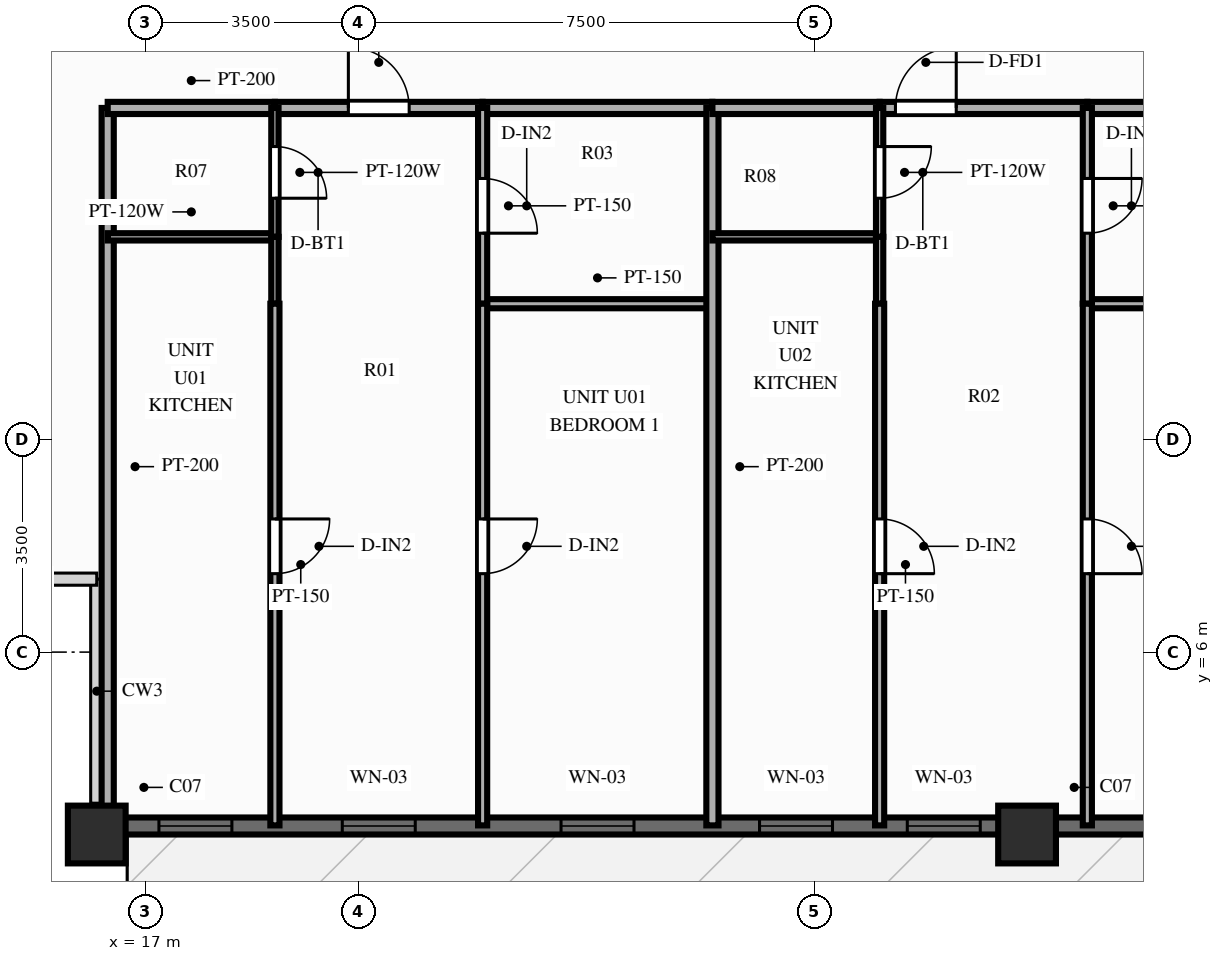
"""IFC4 building model, lengths in metres.
Left out: names, types, materials, properties, quantities, classifications, styles, units other than length and angle.
Written with IfcOpenShell. Run it as: python <this file> out.ifc"""

import sys

from ifc_helpers import new_model, si_unit, direction, frame, frame_2d, origin, origin_2d, place, context, subcontext, project, spatial, rectangle, extrude, source, transform, mapped, element, fill, save


model = new_model("IFC4")
c1 = context("Model", 3, precision=1e-05, world=origin(), true_north=direction((0.0, 1.0)))
c2 = subcontext(c1, "Body", "Model", "MODEL_VIEW")
j1 = project(units=[si_unit("LENGTHUNIT", "METRE"), si_unit("PLANEANGLEUNIT", "RADIAN")], contexts=[c1])
p1 = place(None, origin())
s1 = spatial("IfcSite", under=j1, at=p1, CompositionType="ELEMENT")
p2 = place(p1, origin())
s2 = spatial("IfcBuilding", under=s1, at=p2, CompositionType="ELEMENT")
p3 = place(p2, frame((0.0, 0.0, 89.85)))
s3 = spatial("IfcBuildingStorey", under=s2, at=p3, CompositionType="ELEMENT", Elevation=89.85)
m1 = source(origin(), c2, "Body", "SweptSolid", [
    extrude(rectangle(XDim=0.95, YDim=0.95, at=origin_2d()), origin(), (0.0, 0.0, 1.0), 3.0),
])
for number, where, z_axis, x_axis in (
    (1, (16.2, 3.0, 0.0), (0.0, 0.0, 1.0), (1.0, 0.0, 0.0)),
    (2, (31.5, 3.0, 0.0), (0.0, 0.0, 1.0), (1.0, 0.0, 0.0)),
):
    element("IfcColumn", number, at=place(p3, frame(where, z_axis=z_axis, x_axis=x_axis)), inside=s3, PredefinedType="COLUMN", context=c2, shape_type="MappedRepresentation", body=[
        mapped(m1, transform((0.0, 0.0, 0.0), scale=1.0)),
    ])
p4 = place(p3, frame((16.2, 3.14, 0.0), z_axis=(0.0, 0.0, 1.0), x_axis=(1.0, 0.0, 0.0)))
e3 = element("IfcWall", 3, at=p4, inside=s3, PredefinedType="SOLIDWALL", context=c2, shape_type="SweptSolid", body=[
    extrude(rectangle(XDim=43.6, YDim=0.28, at=frame_2d((21.8, 0.0))), origin(), (0.0, 0.0, 1.0), 2.28),
])
p5 = place(p4, frame((1.022, 0.0, 0.25)))
e4 = element("IfcOpeningElement", 4, at=p5, cuts=e3, PredefinedType="OPENING", context=c2, shape_type="SweptSolid", body=[
    extrude(rectangle(XDim=1.2, YDim=1.5, at=frame_2d((0.6, 0.75))), frame((0.0, 0.152, 0.0), z_axis=(0.0, -1.0, 0.0), x_axis=(1.0, 0.0, 0.0)), (0.0, 0.0, 1.0), 0.304),
])
p6 = place(p4, frame((4.038, 0.0, 0.25)))
e5 = element("IfcOpeningElement", 5, at=p6, cuts=e3, PredefinedType="OPENING", context=c2, shape_type="SweptSolid", body=[
    extrude(rectangle(XDim=1.2, YDim=1.5, at=frame_2d((0.6, 0.75))), frame((0.0, 0.152, 0.0), z_axis=(0.0, -1.0, 0.0), x_axis=(1.0, 0.0, 0.0)), (0.0, 0.0, 1.0), 0.304),
])
p7 = place(p4, frame((7.635, 0.0, 0.25)))
e6 = element("IfcOpeningElement", 6, at=p7, cuts=e3, PredefinedType="OPENING", context=c2, shape_type="SweptSolid", body=[
    extrude(rectangle(XDim=1.2, YDim=1.5, at=frame_2d((0.6, 0.75))), frame((0.0, 0.152, 0.0), z_axis=(0.0, -1.0, 0.0), x_axis=(1.0, 0.0, 0.0)), (0.0, 0.0, 1.0), 0.304),
])
p8 = place(p4, frame((10.9, 0.0, 0.25)))
e7 = element("IfcOpeningElement", 7, at=p8, cuts=e3, PredefinedType="OPENING", context=c2, shape_type="SweptSolid", body=[
    extrude(rectangle(XDim=1.2, YDim=1.5, at=frame_2d((0.6, 0.75))), frame((0.0, 0.152, 0.0), z_axis=(0.0, -1.0, 0.0), x_axis=(1.0, 0.0, 0.0)), (0.0, 0.0, 1.0), 0.304),
])
p9 = place(p4, frame((13.33, 0.0, 0.25)))
e8 = element("IfcOpeningElement", 8, at=p9, cuts=e3, PredefinedType="OPENING", context=c2, shape_type="SweptSolid", body=[
    extrude(rectangle(XDim=1.2, YDim=1.5, at=frame_2d((0.6, 0.75))), frame((0.0, 0.152, 0.0), z_axis=(0.0, -1.0, 0.0), x_axis=(1.0, 0.0, 0.0)), (0.0, 0.0, 1.0), 0.304),
])
p10 = place(p4, frame((17.581, 0.0, 0.25)))
e9 = element("IfcOpeningElement", 9, at=p10, cuts=e3, PredefinedType="OPENING", context=c2, shape_type="SweptSolid", body=[
    extrude(rectangle(XDim=1.2, YDim=1.5, at=frame_2d((0.6, 0.75))), frame((0.0, 0.152, 0.0), z_axis=(0.0, -1.0, 0.0), x_axis=(1.0, 0.0, 0.0)), (0.0, 0.0, 1.0), 0.304),
])
p11 = place(p4, frame((20.988, 0.0, 0.25)))
e10 = element("IfcOpeningElement", 10, at=p11, cuts=e3, PredefinedType="OPENING", context=c2, shape_type="SweptSolid", body=[
    extrude(rectangle(XDim=1.2, YDim=1.5, at=frame_2d((0.6, 0.75))), frame((0.0, 0.152, 0.0), z_axis=(0.0, -1.0, 0.0), x_axis=(1.0, 0.0, 0.0)), (0.0, 0.0, 1.0), 0.304),
])
p12 = place(p4, frame((26.095, 0.0, 0.0), z_axis=(0.0, 0.0, 1.0), x_axis=(-1.0, 0.0, 0.0)))
e11 = element("IfcOpeningElement", 11, at=p12, cuts=e3, PredefinedType="OPENING", context=c2, shape_type="SweptSolid", body=[
    extrude(rectangle(XDim=1.1, YDim=2.15, at=frame_2d((0.55, 1.075))), frame((0.0, 0.152, 0.0), z_axis=(0.0, -1.0, 0.0), x_axis=(1.0, 0.0, 0.0)), (0.0, 0.0, 1.0), 0.304),
])
p13 = place(p4, frame((29.58, 0.0, 0.25)))
e12 = element("IfcOpeningElement", 12, at=p13, cuts=e3, PredefinedType="OPENING", context=c2, shape_type="SweptSolid", body=[
    extrude(rectangle(XDim=1.2, YDim=1.5, at=frame_2d((0.6, 0.75))), frame((0.0, 0.152, 0.0), z_axis=(0.0, -1.0, 0.0), x_axis=(1.0, 0.0, 0.0)), (0.0, 0.0, 1.0), 0.304),
])
p14 = place(p4, frame((32.663, 0.0, 0.25)))
e13 = element("IfcOpeningElement", 13, at=p14, cuts=e3, PredefinedType="OPENING", context=c2, shape_type="SweptSolid", body=[
    extrude(rectangle(XDim=1.2, YDim=1.5, at=frame_2d((0.6, 0.75))), frame((0.0, 0.152, 0.0), z_axis=(0.0, -1.0, 0.0), x_axis=(1.0, 0.0, 0.0)), (0.0, 0.0, 1.0), 0.304),
])
p15 = place(p4, frame((36.632, 0.0, 0.25)))
e14 = element("IfcOpeningElement", 14, at=p15, cuts=e3, PredefinedType="OPENING", context=c2, shape_type="SweptSolid", body=[
    extrude(rectangle(XDim=1.2, YDim=1.5, at=frame_2d((0.6, 0.75))), frame((0.0, 0.152, 0.0), z_axis=(0.0, -1.0, 0.0), x_axis=(1.0, 0.0, 0.0)), (0.0, 0.0, 1.0), 0.304),
])
p16 = place(p4, frame((40.885, 0.0, 0.25)))
e15 = element("IfcOpeningElement", 15, at=p16, cuts=e3, PredefinedType="OPENING", context=c2, shape_type="SweptSolid", body=[
    extrude(rectangle(XDim=1.2, YDim=1.5, at=frame_2d((0.6, 0.75))), frame((0.0, 0.152, 0.0), z_axis=(0.0, -1.0, 0.0), x_axis=(1.0, 0.0, 0.0)), (0.0, 0.0, 1.0), 0.304),
])
p17 = place(p3, frame((16.38, 14.95, 0.0), z_axis=(0.0, 0.0, 1.0), x_axis=(0.0, -1.0, 0.0)))
e16 = element("IfcWall", 16, at=p17, inside=s3, PredefinedType="PARTITIONING", context=c2, shape_type="SweptSolid", body=[
    extrude(rectangle(XDim=11.8, YDim=0.2, at=frame_2d((5.9, 0.0))), origin(), (0.0, 0.0, 1.0), 2.79),
])
p18 = place(p3, frame((16.38, 14.95, 0.0), z_axis=(0.0, 0.0, 1.0), x_axis=(1.0, 0.0, 0.0)))
e17 = element("IfcWall", 17, at=p18, inside=s3, PredefinedType="PARTITIONING", context=c2, shape_type="SweptSolid", body=[
    extrude(rectangle(XDim=2.75, YDim=0.2, at=frame_2d((1.375, 0.0))), origin(), (0.0, 0.0, 1.0), 2.79),
])
p19 = place(p3, frame((19.13, 14.95, 0.0), z_axis=(0.0, 0.0, 1.0), x_axis=(1.0, 0.0, 0.0)))
e18 = element("IfcWall", 18, at=p19, inside=s3, PredefinedType="PARTITIONING", context=c2, shape_type="SweptSolid", body=[
    extrude(rectangle(XDim=3.416, YDim=0.2, at=frame_2d((1.708, 0.0))), origin(), (0.0, 0.0, 1.0), 2.79),
])
p20 = place(p19, frame((1.208, 0.0, 0.0)))
e19 = element("IfcOpeningElement", 19, at=p20, cuts=e18, PredefinedType="OPENING", context=c2, shape_type="SweptSolid", body=[
    extrude(rectangle(XDim=1.0, YDim=2.15, at=frame_2d((0.5, 1.075))), frame((0.0, 0.112, 0.0), z_axis=(0.0, -1.0, 0.0), x_axis=(1.0, 0.0, 0.0)), (0.0, 0.0, 1.0), 0.224),
])
p21 = place(p3, frame((22.546, 14.95, 0.0), z_axis=(0.0, 0.0, 1.0), x_axis=(1.0, 0.0, 0.0)))
e20 = element("IfcWall", 20, at=p21, inside=s3, PredefinedType="PARTITIONING", context=c2, shape_type="SweptSolid", body=[
    extrude(rectangle(XDim=3.779, YDim=0.2, at=frame_2d((1.89, 0.0))), origin(), (0.0, 0.0, 1.0), 2.79),
])
p22 = place(p3, frame((16.38, 12.83, 0.0), z_axis=(0.0, 0.0, 1.0), x_axis=(1.0, 0.0, 0.0)))
e21 = element("IfcWall", 21, at=p22, inside=s3, PredefinedType="PARTITIONING", context=c2, shape_type="SweptSolid", body=[
    extrude(rectangle(XDim=2.75, YDim=0.12, at=frame_2d((1.375, 0.0))), origin(), (0.0, 0.0, 1.0), 2.79),
])
p23 = place(p3, frame((22.546, 11.73, 0.0), z_axis=(0.0, 0.0, 1.0), x_axis=(1.0, 0.0, 0.0)))
e22 = element("IfcWall", 22, at=p23, inside=s3, PredefinedType="PARTITIONING", context=c2, shape_type="SweptSolid", body=[
    extrude(rectangle(XDim=3.779, YDim=0.15, at=frame_2d((1.89, 0.0))), origin(), (0.0, 0.0, 1.0), 2.79),
])
p24 = place(p3, frame((19.13, 14.95, 0.0), z_axis=(0.0, 0.0, 1.0), x_axis=(0.0, -1.0, 0.0)))
e23 = element("IfcWall", 23, at=p24, inside=s3, PredefinedType="PARTITIONING", context=c2, shape_type="SweptSolid", body=[
    extrude(rectangle(XDim=2.12, YDim=0.12, at=frame_2d((1.06, 0.0))), origin(), (0.0, 0.0, 1.0), 2.79),
])
p25 = place(p24, frame((0.635, 0.0, 0.0)))
e24 = element("IfcOpeningElement", 24, at=p25, cuts=e23, PredefinedType="OPENING", context=c2, shape_type="SweptSolid", body=[
    extrude(rectangle(XDim=0.85, YDim=2.05, at=frame_2d((0.425, 1.025))), frame((0.0, 0.072, 0.0), z_axis=(0.0, -1.0, 0.0), x_axis=(1.0, 0.0, 0.0)), (0.0, 0.0, 1.0), 0.144),
])
p26 = place(p3, frame((19.13, 12.83, 0.0), z_axis=(0.0, 0.0, 1.0), x_axis=(0.0, -1.0, 0.0)))
e25 = element("IfcWall", 25, at=p26, inside=s3, PredefinedType="PARTITIONING", context=c2, shape_type="SweptSolid", body=[
    extrude(rectangle(XDim=1.1, YDim=0.12, at=frame_2d((0.55, 0.0))), origin(), (0.0, 0.0, 1.0), 2.79),
])
p27 = place(p3, frame((19.13, 11.73, 0.0), z_axis=(0.0, 0.0, 1.0), x_axis=(0.0, -1.0, 0.0)))
e26 = element("IfcWall", 26, at=p27, inside=s3, PredefinedType="PARTITIONING", context=c2, shape_type="SweptSolid", body=[
    extrude(rectangle(XDim=8.58, YDim=0.15, at=frame_2d((4.29, 0.0))), origin(), (0.0, 0.0, 1.0), 2.79),
])
p28 = place(p27, frame((3.54, 0.0, 0.0)))
e27 = element("IfcOpeningElement", 27, at=p28, cuts=e26, PredefinedType="OPENING", context=c2, shape_type="SweptSolid", body=[
    extrude(rectangle(XDim=0.9, YDim=2.1, at=frame_2d((0.45, 1.05))), frame((0.0, 0.087, 0.0), z_axis=(0.0, -1.0, 0.0), x_axis=(1.0, 0.0, 0.0)), (0.0, 0.0, 1.0), 0.174),
])
p29 = place(p3, frame((22.546, 14.95, 0.0), z_axis=(0.0, 0.0, 1.0), x_axis=(0.0, -1.0, 0.0)))
e28 = element("IfcWall", 28, at=p29, inside=s3, PredefinedType="PARTITIONING", context=c2, shape_type="SweptSolid", body=[
    extrude(rectangle(XDim=3.22, YDim=0.15, at=frame_2d((1.61, 0.0))), origin(), (0.0, 0.0, 1.0), 2.79),
])
p30 = place(p29, frame((1.16, 0.0, 0.0)))
e29 = element("IfcOpeningElement", 29, at=p30, cuts=e28, PredefinedType="OPENING", context=c2, shape_type="SweptSolid", body=[
    extrude(rectangle(XDim=0.9, YDim=2.1, at=frame_2d((0.45, 1.05))), frame((0.0, 0.087, 0.0), z_axis=(0.0, -1.0, 0.0), x_axis=(1.0, 0.0, 0.0)), (0.0, 0.0, 1.0), 0.174),
])
p31 = place(p3, frame((22.546, 11.73, 0.0), z_axis=(0.0, 0.0, 1.0), x_axis=(0.0, -1.0, 0.0)))
e30 = element("IfcWall", 30, at=p31, inside=s3, PredefinedType="PARTITIONING", context=c2, shape_type="SweptSolid", body=[
    extrude(rectangle(XDim=8.58, YDim=0.15, at=frame_2d((4.29, 0.0))), origin(), (0.0, 0.0, 1.0), 2.79),
])
p32 = place(p31, frame((3.54, 0.0, 0.0)))
e31 = element("IfcOpeningElement", 31, at=p32, cuts=e30, PredefinedType="OPENING", context=c2, shape_type="SweptSolid", body=[
    extrude(rectangle(XDim=0.9, YDim=2.1, at=frame_2d((0.45, 1.05))), frame((0.0, 0.087, 0.0), z_axis=(0.0, -1.0, 0.0), x_axis=(1.0, 0.0, 0.0)), (0.0, 0.0, 1.0), 0.174),
])
p33 = place(p3, frame((26.325, 14.95, 0.0), z_axis=(0.0, 0.0, 1.0), x_axis=(0.0, -1.0, 0.0)))
e32 = element("IfcWall", 32, at=p33, inside=s3, PredefinedType="PARTITIONING", context=c2, shape_type="SweptSolid", body=[
    extrude(rectangle(XDim=11.8, YDim=0.2, at=frame_2d((5.9, 0.0))), origin(), (0.0, 0.0, 1.0), 2.79),
])
p34 = place(p3, frame((26.325, 14.95, 0.0), z_axis=(0.0, 0.0, 1.0), x_axis=(1.0, 0.0, 0.0)))
e33 = element("IfcWall", 33, at=p34, inside=s3, PredefinedType="PARTITIONING", context=c2, shape_type="SweptSolid", body=[
    extrude(rectangle(XDim=2.75, YDim=0.2, at=frame_2d((1.375, 0.0))), origin(), (0.0, 0.0, 1.0), 2.79),
])
p35 = place(p3, frame((29.075, 14.95, 0.0), z_axis=(0.0, 0.0, 1.0), x_axis=(1.0, 0.0, 0.0)))
e34 = element("IfcWall", 34, at=p35, inside=s3, PredefinedType="PARTITIONING", context=c2, shape_type="SweptSolid", body=[
    extrude(rectangle(XDim=3.416, YDim=0.2, at=frame_2d((1.708, 0.0))), origin(), (0.0, 0.0, 1.0), 2.79),
])
p36 = place(p35, frame((0.26, 0.0, 0.0)))
e35 = element("IfcOpeningElement", 35, at=p36, cuts=e34, PredefinedType="OPENING", context=c2, shape_type="SweptSolid", body=[
    extrude(rectangle(XDim=1.0, YDim=2.15, at=frame_2d((0.5, 1.075))), frame((0.0, 0.112, 0.0), z_axis=(0.0, -1.0, 0.0), x_axis=(1.0, 0.0, 0.0)), (0.0, 0.0, 1.0), 0.224),
])
p37 = place(p3, frame((32.491, 14.95, 0.0), z_axis=(0.0, 0.0, 1.0), x_axis=(1.0, 0.0, 0.0)))
e36 = element("IfcWall", 36, at=p37, inside=s3, PredefinedType="PARTITIONING", context=c2, shape_type="SweptSolid", body=[
    extrude(rectangle(XDim=3.779, YDim=0.2, at=frame_2d((1.89, 0.0))), origin(), (0.0, 0.0, 1.0), 2.79),
])
p38 = place(p3, frame((26.325, 12.83, 0.0), z_axis=(0.0, 0.0, 1.0), x_axis=(1.0, 0.0, 0.0)))
e37 = element("IfcWall", 37, at=p38, inside=s3, PredefinedType="PARTITIONING", context=c2, shape_type="SweptSolid", body=[
    extrude(rectangle(XDim=2.75, YDim=0.12, at=frame_2d((1.375, 0.0))), origin(), (0.0, 0.0, 1.0), 2.79),
])
p39 = place(p3, frame((32.491, 11.73, 0.0), z_axis=(0.0, 0.0, 1.0), x_axis=(1.0, 0.0, 0.0)))
e38 = element("IfcWall", 38, at=p39, inside=s3, PredefinedType="PARTITIONING", context=c2, shape_type="SweptSolid", body=[
    extrude(rectangle(XDim=3.779, YDim=0.15, at=frame_2d((1.89, 0.0))), origin(), (0.0, 0.0, 1.0), 2.79),
])
p40 = place(p3, frame((29.075, 14.95, 0.0), z_axis=(0.0, 0.0, 1.0), x_axis=(0.0, -1.0, 0.0)))
e39 = element("IfcWall", 39, at=p40, inside=s3, PredefinedType="PARTITIONING", context=c2, shape_type="SweptSolid", body=[
    extrude(rectangle(XDim=2.12, YDim=0.12, at=frame_2d((1.06, 0.0))), origin(), (0.0, 0.0, 1.0), 2.79),
])
p41 = place(p40, frame((0.635, 0.0, 0.0)))
e40 = element("IfcOpeningElement", 40, at=p41, cuts=e39, PredefinedType="OPENING", context=c2, shape_type="SweptSolid", body=[
    extrude(rectangle(XDim=0.85, YDim=2.05, at=frame_2d((0.425, 1.025))), frame((0.0, 0.072, 0.0), z_axis=(0.0, -1.0, 0.0), x_axis=(1.0, 0.0, 0.0)), (0.0, 0.0, 1.0), 0.144),
])
p42 = place(p3, frame((29.075, 12.83, 0.0), z_axis=(0.0, 0.0, 1.0), x_axis=(0.0, -1.0, 0.0)))
e41 = element("IfcWall", 41, at=p42, inside=s3, PredefinedType="PARTITIONING", context=c2, shape_type="SweptSolid", body=[
    extrude(rectangle(XDim=1.1, YDim=0.12, at=frame_2d((0.55, 0.0))), origin(), (0.0, 0.0, 1.0), 2.79),
])
p43 = place(p3, frame((29.075, 11.73, 0.0), z_axis=(0.0, 0.0, 1.0), x_axis=(0.0, -1.0, 0.0)))
e42 = element("IfcWall", 42, at=p43, inside=s3, PredefinedType="PARTITIONING", context=c2, shape_type="SweptSolid", body=[
    extrude(rectangle(XDim=8.58, YDim=0.15, at=frame_2d((4.29, 0.0))), origin(), (0.0, 0.0, 1.0), 2.79),
])
p44 = place(p43, frame((3.54, 0.0, 0.0)))
e43 = element("IfcOpeningElement", 43, at=p44, cuts=e42, PredefinedType="OPENING", context=c2, shape_type="SweptSolid", body=[
    extrude(rectangle(XDim=0.9, YDim=2.1, at=frame_2d((0.45, 1.05))), frame((0.0, 0.087, 0.0), z_axis=(0.0, -1.0, 0.0), x_axis=(1.0, 0.0, 0.0)), (0.0, 0.0, 1.0), 0.174),
])
p45 = place(p3, frame((32.491, 14.95, 0.0), z_axis=(0.0, 0.0, 1.0), x_axis=(0.0, -1.0, 0.0)))
e44 = element("IfcWall", 44, at=p45, inside=s3, PredefinedType="PARTITIONING", context=c2, shape_type="SweptSolid", body=[
    extrude(rectangle(XDim=3.22, YDim=0.15, at=frame_2d((1.61, 0.0))), origin(), (0.0, 0.0, 1.0), 2.79),
])
p46 = place(p45, frame((1.16, 0.0, 0.0)))
e45 = element("IfcOpeningElement", 45, at=p46, cuts=e44, PredefinedType="OPENING", context=c2, shape_type="SweptSolid", body=[
    extrude(rectangle(XDim=0.9, YDim=2.1, at=frame_2d((0.45, 1.05))), frame((0.0, 0.087, 0.0), z_axis=(0.0, -1.0, 0.0), x_axis=(1.0, 0.0, 0.0)), (0.0, 0.0, 1.0), 0.174),
])
p47 = place(p3, frame((32.491, 11.73, 0.0), z_axis=(0.0, 0.0, 1.0), x_axis=(0.0, -1.0, 0.0)))
e46 = element("IfcWall", 46, at=p47, inside=s3, PredefinedType="PARTITIONING", context=c2, shape_type="SweptSolid", body=[
    extrude(rectangle(XDim=8.58, YDim=0.15, at=frame_2d((4.29, 0.0))), origin(), (0.0, 0.0, 1.0), 2.79),
])
p48 = place(p47, frame((3.54, 0.0, 0.0)))
e47 = element("IfcOpeningElement", 47, at=p48, cuts=e46, PredefinedType="OPENING", context=c2, shape_type="SweptSolid", body=[
    extrude(rectangle(XDim=0.9, YDim=2.1, at=frame_2d((0.45, 1.05))), frame((0.0, 0.087, 0.0), z_axis=(0.0, -1.0, 0.0), x_axis=(1.0, 0.0, 0.0)), (0.0, 0.0, 1.0), 0.174),
])
m2 = source(origin(), c2, "Body", "SweptSolid", [
    extrude(rectangle(XDim=1.2, YDim=1.5, at=frame_2d((0.6, 0.75))), frame((0.0, 0.03, 0.0), z_axis=(0.0, -1.0, 0.0), x_axis=(1.0, 0.0, 0.0)), (0.0, 0.0, 1.0), 0.06),
])
p49 = place(p5, origin())
e48 = element("IfcWindow", 48, at=p49, inside=s3, PartitioningType="SINGLE_PANEL", PredefinedType="WINDOW", context=c2, shape_type="MappedRepresentation", body=[
    mapped(m2, transform((0.0, 0.0, 0.0), scale=1.0)),
])
fill(e4, e48)
p50 = place(p6, origin())
e49 = element("IfcWindow", 49, at=p50, inside=s3, PartitioningType="SINGLE_PANEL", PredefinedType="WINDOW", context=c2, shape_type="MappedRepresentation", body=[
    mapped(m2, transform((0.0, 0.0, 0.0), scale=1.0)),
])
fill(e5, e49)
p51 = place(p7, origin())
e50 = element("IfcWindow", 50, at=p51, inside=s3, PartitioningType="SINGLE_PANEL", PredefinedType="WINDOW", context=c2, shape_type="MappedRepresentation", body=[
    mapped(m2, transform((0.0, 0.0, 0.0), scale=1.0)),
])
fill(e6, e50)
p52 = place(p8, origin())
e51 = element("IfcWindow", 51, at=p52, inside=s3, PartitioningType="SINGLE_PANEL", PredefinedType="WINDOW", context=c2, shape_type="MappedRepresentation", body=[
    mapped(m2, transform((0.0, 0.0, 0.0), scale=1.0)),
])
fill(e7, e51)
p53 = place(p9, origin())
e52 = element("IfcWindow", 52, at=p53, inside=s3, PartitioningType="SINGLE_PANEL", PredefinedType="WINDOW", context=c2, shape_type="MappedRepresentation", body=[
    mapped(m2, transform((0.0, 0.0, 0.0), scale=1.0)),
])
fill(e8, e52)
m3 = source(origin(), c2, "Body", "SweptSolid", [
    extrude(rectangle(XDim=1.0, YDim=2.15, at=frame_2d((0.5, 1.075))), frame((0.0, 0.025, 0.0), z_axis=(0.0, -1.0, 0.0), x_axis=(1.0, 0.0, 0.0)), (0.0, 0.0, 1.0), 0.05),
])
p54 = place(p20, origin())
e53 = element("IfcDoor", 53, at=p54, inside=s3, OperationType="SINGLE_SWING_LEFT", PredefinedType="DOOR", context=c2, shape_type="MappedRepresentation", body=[
    mapped(m3, transform((0.0, 0.0, 0.0), scale=1.0)),
])
fill(e19, e53)
m4 = source(origin(), c2, "Body", "SweptSolid", [
    extrude(rectangle(XDim=0.85, YDim=2.05, at=frame_2d((0.425, 1.025))), frame((0.0, 0.025, 0.0), z_axis=(0.0, -1.0, 0.0), x_axis=(1.0, 0.0, 0.0)), (0.0, 0.0, 1.0), 0.05),
])
p55 = place(p25, origin())
e54 = element("IfcDoor", 54, at=p55, inside=s3, OperationType="SINGLE_SWING_RIGHT", PredefinedType="DOOR", context=c2, shape_type="MappedRepresentation", body=[
    mapped(m4, transform((0.0, 0.0, 0.0), scale=1.0)),
])
fill(e24, e54)
m5 = source(origin(), c2, "Body", "SweptSolid", [
    extrude(rectangle(XDim=0.9, YDim=2.1, at=frame_2d((0.45, 1.05))), frame((0.0, 0.025, 0.0), z_axis=(0.0, -1.0, 0.0), x_axis=(1.0, 0.0, 0.0)), (0.0, 0.0, 1.0), 0.05),
])
p56 = place(p28, origin())
e55 = element("IfcDoor", 55, at=p56, inside=s3, OperationType="SINGLE_SWING_LEFT", PredefinedType="DOOR", context=c2, shape_type="MappedRepresentation", body=[
    mapped(m5, transform((0.0, 0.0, 0.0), scale=1.0)),
])
fill(e27, e55)
p57 = place(p30, origin())
e56 = element("IfcDoor", 56, at=p57, inside=s3, OperationType="SINGLE_SWING_RIGHT", PredefinedType="DOOR", context=c2, shape_type="MappedRepresentation", body=[
    mapped(m5, transform((0.0, 0.0, 0.0), scale=1.0)),
])
fill(e29, e56)
p58 = place(p32, origin())
e57 = element("IfcDoor", 57, at=p58, inside=s3, OperationType="SINGLE_SWING_LEFT", PredefinedType="DOOR", context=c2, shape_type="MappedRepresentation", body=[
    mapped(m5, transform((0.0, 0.0, 0.0), scale=1.0)),
])
fill(e31, e57)
p59 = place(p36, origin())
e58 = element("IfcDoor", 58, at=p59, inside=s3, OperationType="SINGLE_SWING_RIGHT", PredefinedType="DOOR", context=c2, shape_type="MappedRepresentation", body=[
    mapped(m3, transform((0.0, 0.0, 0.0), scale=1.0)),
])
fill(e35, e58)
p60 = place(p41, origin())
e59 = element("IfcDoor", 59, at=p60, inside=s3, OperationType="SINGLE_SWING_LEFT", PredefinedType="DOOR", context=c2, shape_type="MappedRepresentation", body=[
    mapped(m4, transform((0.0, 0.0, 0.0), scale=1.0)),
])
fill(e40, e59)
p61 = place(p44, origin())
e60 = element("IfcDoor", 60, at=p61, inside=s3, OperationType="SINGLE_SWING_RIGHT", PredefinedType="DOOR", context=c2, shape_type="MappedRepresentation", body=[
    mapped(m5, transform((0.0, 0.0, 0.0), scale=1.0)),
])
fill(e43, e60)
p62 = place(p46, origin())
e61 = element("IfcDoor", 61, at=p62, inside=s3, OperationType="SINGLE_SWING_LEFT", PredefinedType="DOOR", context=c2, shape_type="MappedRepresentation", body=[
    mapped(m5, transform((0.0, 0.0, 0.0), scale=1.0)),
])
fill(e45, e61)
p63 = place(p48, origin())
e62 = element("IfcDoor", 62, at=p63, inside=s3, OperationType="SINGLE_SWING_RIGHT", PredefinedType="DOOR", context=c2, shape_type="MappedRepresentation", body=[
    mapped(m5, transform((0.0, 0.0, 0.0), scale=1.0)),
])
fill(e47, e62)
save(model, sys.argv[1])
